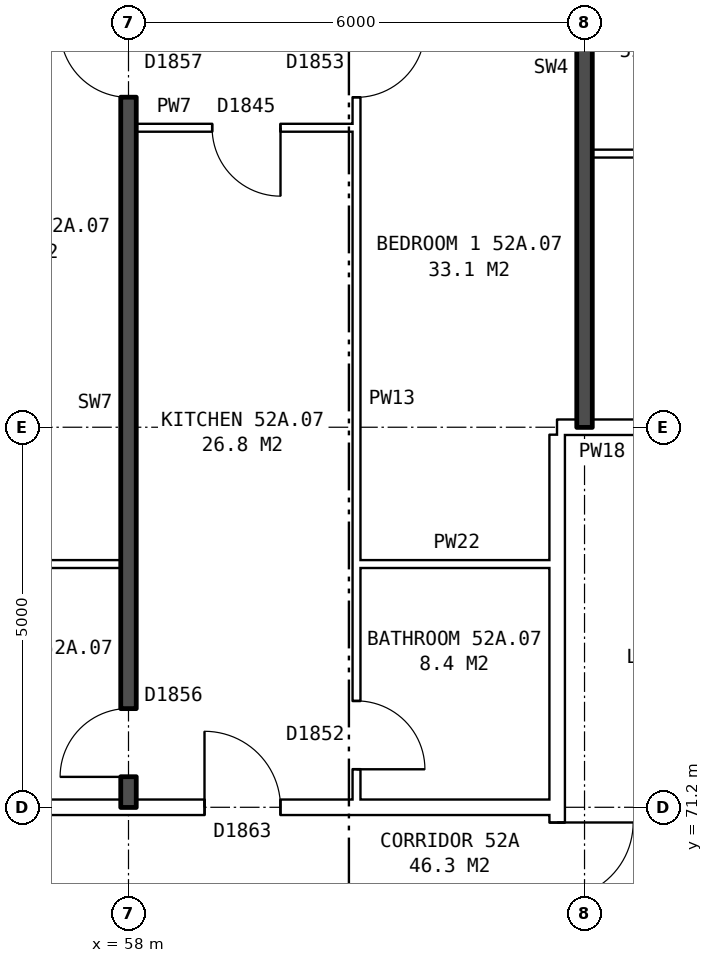
"""IFC4 building model, lengths in metres.
Left out: names, types, materials, properties, quantities, classifications, styles, units other than length and angle.
Written with IfcOpenShell. Run it as: python <this file> out.ifc"""

import sys

from ifc_helpers import new_model, si_unit, direction, frame, frame_2d, origin, place, context, subcontext, project, spatial, rectangle, extrude, element, fill, save


model = new_model("IFC4")
c1 = context("Model", 3, precision=1e-05, world=origin(), true_north=direction((0.0, 1.0)))
c2 = subcontext(c1, "Body", "Model", "MODEL_VIEW")
j1 = project(units=[si_unit("LENGTHUNIT", "METRE"), si_unit("PLANEANGLEUNIT", "RADIAN")], contexts=[c1])
p1 = place(None, origin())
s1 = spatial("IfcSite", under=j1, at=p1, CompositionType="ELEMENT")
p2 = place(p1, origin())
s2 = spatial("IfcBuilding", under=s1, at=p2, CompositionType="ELEMENT")
p3 = place(p2, frame((0.0, 0.0, 185.1)))
s3 = spatial("IfcBuildingStorey", under=s2, at=p3, CompositionType="ELEMENT", Elevation=185.1)
p4 = place(p3, frame((63.64, 63.9, 0.0), z_axis=(0.0, 0.0, 1.0), x_axis=(0.0, 1.0, 0.0)))
e1 = element("IfcWall", 1, at=p4, inside=s3, PredefinedType="PARTITIONING", context=c2, shape_type="SweptSolid", body=[
    extrude(rectangle(XDim=12.2, YDim=0.2, at=frame_2d((6.1, 0.0))), origin(), (0.0, 0.0, 1.0), 2.85),
])
p5 = place(p4, frame((5.1, 0.0, 0.0)))
e2 = element("IfcOpeningElement", 2, at=p5, cuts=e1, PredefinedType="OPENING", context=c2, shape_type="SweptSolid", body=[
    extrude(rectangle(XDim=2.0, YDim=2.1, at=frame_2d((1.0, 1.05))), frame((0.0, 0.11, 0.0), z_axis=(0.0, -1.0, 0.0), x_axis=(1.0, 0.0, 0.0)), (0.0, 0.0, 1.0), 0.22),
])
p6 = place(p3, frame((44.36, 71.2, 0.0), z_axis=(0.0, 0.0, 1.0), x_axis=(1.0, 0.0, 0.0)))
e3 = element("IfcWall", 3, at=p6, inside=s3, PredefinedType="PARTITIONING", context=c2, shape_type="SweptSolid", body=[
    extrude(rectangle(XDim=19.28, YDim=0.2, at=frame_2d((9.64, 0.0))), origin(), (0.0, 0.0, 1.0), 2.85),
])
p7 = place(p6, frame((14.64, 0.0, 0.0)))
e4 = element("IfcOpeningElement", 4, at=p7, cuts=e3, PredefinedType="OPENING", context=c2, shape_type="SweptSolid", body=[
    extrude(rectangle(XDim=1.0, YDim=2.1, at=frame_2d((0.5, 1.05))), frame((0.0, 0.11, 0.0), z_axis=(0.0, -1.0, 0.0), x_axis=(1.0, 0.0, 0.0)), (0.0, 0.0, 1.0), 0.22),
])
p8 = place(p6, frame((5.64, 0.0, 0.0)))
e5 = element("IfcOpeningElement", 5, at=p8, cuts=e3, PredefinedType="OPENING", context=c2, shape_type="SweptSolid", body=[
    extrude(rectangle(XDim=1.0, YDim=2.1, at=frame_2d((0.5, 1.05))), frame((0.0, 0.11, 0.0), z_axis=(0.0, -1.0, 0.0), x_axis=(1.0, 0.0, 0.0)), (0.0, 0.0, 1.0), 0.22),
])
p9 = place(p3, frame((52.1, 74.4, 0.0), z_axis=(0.0, 0.0, 1.0), x_axis=(1.0, 0.0, 0.0)))
e6 = element("IfcWall", 6, at=p9, inside=s3, PredefinedType="PARTITIONING", context=c2, shape_type="SweptSolid", body=[
    extrude(rectangle(XDim=5.8, YDim=0.1, at=frame_2d((2.9, 0.0))), origin(), (0.0, 0.0, 1.0), 2.85),
])
p10 = place(p3, frame((61.0, 74.4, 0.0), z_axis=(0.0, 0.0, 1.0), x_axis=(1.0, 0.0, 0.0)))
e7 = element("IfcWall", 7, at=p10, inside=s3, PredefinedType="PARTITIONING", context=c2, shape_type="SweptSolid", body=[
    extrude(rectangle(XDim=2.64, YDim=0.1, at=frame_2d((1.32, 0.0))), origin(), (0.0, 0.0, 1.0), 2.85),
])
p11 = place(p3, frame((63.64, 76.2, 0.0), z_axis=(0.0, 0.0, 1.0), x_axis=(1.0, 0.0, 0.0)))
e8 = element("IfcWall", 8, at=p11, inside=s3, PredefinedType="PARTITIONING", context=c2, shape_type="SweptSolid", body=[
    extrude(rectangle(XDim=3.0, YDim=0.2, at=frame_2d((1.5, 0.0))), origin(), (0.0, 0.0, 1.0), 2.85),
])
p12 = place(p11, frame((1.18, 0.0, 0.0)))
e9 = element("IfcOpeningElement", 9, at=p12, cuts=e8, PredefinedType="OPENING", context=c2, shape_type="SweptSolid", body=[
    extrude(rectangle(XDim=1.0, YDim=2.1, at=frame_2d((0.5, 1.05))), frame((0.0, 0.11, 0.0), z_axis=(0.0, -1.0, 0.0), x_axis=(1.0, 0.0, 0.0)), (0.0, 0.0, 1.0), 0.22),
])
p13 = place(p3, frame((64.1, 79.8, 0.0), z_axis=(0.0, 0.0, 1.0), x_axis=(1.0, 0.0, 0.0)))
e10 = element("IfcWall", 10, at=p13, inside=s3, PredefinedType="PARTITIONING", context=c2, shape_type="SweptSolid", body=[
    extrude(rectangle(XDim=5.8, YDim=0.1, at=frame_2d((2.9, 0.0))), origin(), (0.0, 0.0, 1.0), 2.85),
])
p14 = place(p13, frame((3.6, 0.0, 0.0)))
e11 = element("IfcOpeningElement", 11, at=p14, cuts=e10, PredefinedType="OPENING", context=c2, shape_type="SweptSolid", body=[
    extrude(rectangle(XDim=0.9, YDim=2.1, at=frame_2d((0.45, 1.05))), frame((0.0, 0.06, 0.0), z_axis=(0.0, -1.0, 0.0), x_axis=(1.0, 0.0, 0.0)), (0.0, 0.0, 1.0), 0.12),
])
p15 = place(p13, frame((0.7, 0.0, 0.0)))
e12 = element("IfcOpeningElement", 12, at=p15, cuts=e10, PredefinedType="OPENING", context=c2, shape_type="SweptSolid", body=[
    extrude(rectangle(XDim=0.9, YDim=2.1, at=frame_2d((0.45, 1.05))), frame((0.0, 0.06, 0.0), z_axis=(0.0, -1.0, 0.0), x_axis=(1.0, 0.0, 0.0)), (0.0, 0.0, 1.0), 0.12),
])
p16 = place(p3, frame((58.1, 80.14, 0.0), z_axis=(0.0, 0.0, 1.0), x_axis=(1.0, 0.0, 0.0)))
e13 = element("IfcWall", 13, at=p16, inside=s3, PredefinedType="PARTITIONING", context=c2, shape_type="SweptSolid", body=[
    extrude(rectangle(XDim=2.9, YDim=0.1, at=frame_2d((1.45, 0.0))), origin(), (0.0, 0.0, 1.0), 2.85),
])
p17 = place(p16, frame((1.0, 0.0, 0.0)))
e14 = element("IfcOpeningElement", 14, at=p17, cuts=e13, PredefinedType="OPENING", context=c2, shape_type="SweptSolid", body=[
    extrude(rectangle(XDim=0.9, YDim=2.1, at=frame_2d((0.45, 1.05))), frame((0.0, 0.06, 0.0), z_axis=(0.0, -1.0, 0.0), x_axis=(1.0, 0.0, 0.0)), (0.0, 0.0, 1.0), 0.12),
])
p18 = place(p3, frame((58.0, 71.2, 0.0), z_axis=(0.0, 0.0, 1.0), x_axis=(0.0, 1.0, 0.0)))
e15 = element("IfcWall", 15, at=p18, inside=s3, PredefinedType="SOLIDWALL", context=c2, shape_type="SweptSolid", body=[
    extrude(rectangle(XDim=14.44, YDim=0.2, at=frame_2d((7.22, 0.0))), origin(), (0.0, 0.0, 1.0), 2.85),
])
p19 = place(p18, frame((9.34, 0.0, 0.0)))
e16 = element("IfcOpeningElement", 16, at=p19, cuts=e15, PredefinedType="OPENING", context=c2, shape_type="SweptSolid", body=[
    extrude(rectangle(XDim=0.9, YDim=2.1, at=frame_2d((0.45, 1.05))), frame((0.0, 0.11, 0.0), z_axis=(0.0, -1.0, 0.0), x_axis=(1.0, 0.0, 0.0)), (0.0, 0.0, 1.0), 0.22),
])
p20 = place(p18, frame((0.4, 0.0, 0.0)))
e17 = element("IfcOpeningElement", 17, at=p20, cuts=e15, PredefinedType="OPENING", context=c2, shape_type="SweptSolid", body=[
    extrude(rectangle(XDim=0.9, YDim=2.1, at=frame_2d((0.45, 1.05))), frame((0.0, 0.11, 0.0), z_axis=(0.0, -1.0, 0.0), x_axis=(1.0, 0.0, 0.0)), (0.0, 0.0, 1.0), 0.22),
])
p21 = place(p3, frame((61.0, 71.3, 0.0), z_axis=(0.0, 0.0, 1.0), x_axis=(0.0, 1.0, 0.0)))
e18 = element("IfcWall", 18, at=p21, inside=s3, PredefinedType="PARTITIONING", context=c2, shape_type="SweptSolid", body=[
    extrude(rectangle(XDim=14.34, YDim=0.1, at=frame_2d((7.17, 0.0))), origin(), (0.0, 0.0, 1.0), 2.85),
])
p22 = place(p21, frame((9.24, 0.0, 0.0)))
e19 = element("IfcOpeningElement", 19, at=p22, cuts=e18, PredefinedType="OPENING", context=c2, shape_type="SweptSolid", body=[
    extrude(rectangle(XDim=0.9, YDim=2.1, at=frame_2d((0.45, 1.05))), frame((0.0, 0.06, 0.0), z_axis=(0.0, -1.0, 0.0), x_axis=(1.0, 0.0, 0.0)), (0.0, 0.0, 1.0), 0.12),
])
p23 = place(p21, frame((0.4, 0.0, 0.0)))
e20 = element("IfcOpeningElement", 20, at=p23, cuts=e18, PredefinedType="OPENING", context=c2, shape_type="SweptSolid", body=[
    extrude(rectangle(XDim=0.9, YDim=2.1, at=frame_2d((0.45, 1.05))), frame((0.0, 0.06, 0.0), z_axis=(0.0, -1.0, 0.0), x_axis=(1.0, 0.0, 0.0)), (0.0, 0.0, 1.0), 0.12),
])
p24 = place(p3, frame((64.0, 76.2, 0.0), z_axis=(0.0, 0.0, 1.0), x_axis=(0.0, 1.0, 0.0)))
e21 = element("IfcWall", 21, at=p24, inside=s3, PredefinedType="SOLIDWALL", context=c2, shape_type="SweptSolid", body=[
    extrude(rectangle(XDim=9.44, YDim=0.2, at=frame_2d((4.72, 0.0))), origin(), (0.0, 0.0, 1.0), 2.85),
])
p25 = place(p5, frame((2.0, 0.0, 0.0), z_axis=(0.0, 0.0, 1.0), x_axis=(-1.0, 0.0, 0.0)))
e22 = element("IfcDoor", 22, at=p25, inside=s3, OperationType="DOUBLE_DOOR_SINGLE_SWING", PredefinedType="DOOR", context=c2, shape_type="SweptSolid", body=[
    extrude(rectangle(XDim=2.0, YDim=2.1, at=frame_2d((1.0, 1.05))), frame((0.0, 0.025, 0.0), z_axis=(0.0, -1.0, 0.0), x_axis=(1.0, 0.0, 0.0)), (0.0, 0.0, 1.0), 0.05),
])
fill(e2, e22)
p26 = place(p22, frame((0.9, 0.0, 0.0), z_axis=(0.0, 0.0, 1.0), x_axis=(-1.0, 0.0, 0.0)))
e23 = element("IfcDoor", 23, at=p26, inside=s3, OperationType="SINGLE_SWING_LEFT", PredefinedType="DOOR", context=c2, shape_type="SweptSolid", body=[
    extrude(rectangle(XDim=0.9, YDim=2.1, at=frame_2d((0.45, 1.05))), frame((0.0, 0.025, 0.0), z_axis=(0.0, -1.0, 0.0), x_axis=(1.0, 0.0, 0.0)), (0.0, 0.0, 1.0), 0.05),
])
fill(e19, e23)
p27 = place(p19, origin())
e24 = element("IfcDoor", 24, at=p27, inside=s3, OperationType="SINGLE_SWING_RIGHT", PredefinedType="DOOR", context=c2, shape_type="SweptSolid", body=[
    extrude(rectangle(XDim=0.9, YDim=2.1, at=frame_2d((0.45, 1.05))), frame((0.0, 0.025, 0.0), z_axis=(0.0, -1.0, 0.0), x_axis=(1.0, 0.0, 0.0)), (0.0, 0.0, 1.0), 0.05),
])
fill(e16, e24)
p28 = place(p7, origin())
e25 = element("IfcDoor", 25, at=p28, inside=s3, OperationType="SINGLE_SWING_LEFT", PredefinedType="DOOR", context=c2, shape_type="SweptSolid", body=[
    extrude(rectangle(XDim=1.0, YDim=2.1, at=frame_2d((0.5, 1.05))), frame((0.0, 0.025, 0.0), z_axis=(0.0, -1.0, 0.0), x_axis=(1.0, 0.0, 0.0)), (0.0, 0.0, 1.0), 0.05),
])
fill(e4, e25)
p29 = place(p17, frame((0.9, 0.0, 0.0), z_axis=(0.0, 0.0, 1.0), x_axis=(-1.0, 0.0, 0.0)))
e26 = element("IfcDoor", 26, at=p29, inside=s3, OperationType="SINGLE_SWING_LEFT", PredefinedType="DOOR", context=c2, shape_type="SweptSolid", body=[
    extrude(rectangle(XDim=0.9, YDim=2.1, at=frame_2d((0.45, 1.05))), frame((0.0, 0.025, 0.0), z_axis=(0.0, -1.0, 0.0), x_axis=(1.0, 0.0, 0.0)), (0.0, 0.0, 1.0), 0.05),
])
fill(e14, e26)
p30 = place(p23, frame((0.9, 0.0, 0.0), z_axis=(0.0, 0.0, 1.0), x_axis=(-1.0, 0.0, 0.0)))
e27 = element("IfcDoor", 27, at=p30, inside=s3, OperationType="SINGLE_SWING_RIGHT", PredefinedType="DOOR", context=c2, shape_type="SweptSolid", body=[
    extrude(rectangle(XDim=0.9, YDim=2.1, at=frame_2d((0.45, 1.05))), frame((0.0, 0.025, 0.0), z_axis=(0.0, -1.0, 0.0), x_axis=(1.0, 0.0, 0.0)), (0.0, 0.0, 1.0), 0.05),
])
fill(e20, e27)
p31 = place(p20, origin())
e28 = element("IfcDoor", 28, at=p31, inside=s3, OperationType="SINGLE_SWING_LEFT", PredefinedType="DOOR", context=c2, shape_type="SweptSolid", body=[
    extrude(rectangle(XDim=0.9, YDim=2.1, at=frame_2d((0.45, 1.05))), frame((0.0, 0.025, 0.0), z_axis=(0.0, -1.0, 0.0), x_axis=(1.0, 0.0, 0.0)), (0.0, 0.0, 1.0), 0.05),
])
fill(e17, e28)
save(model, sys.argv[1])
